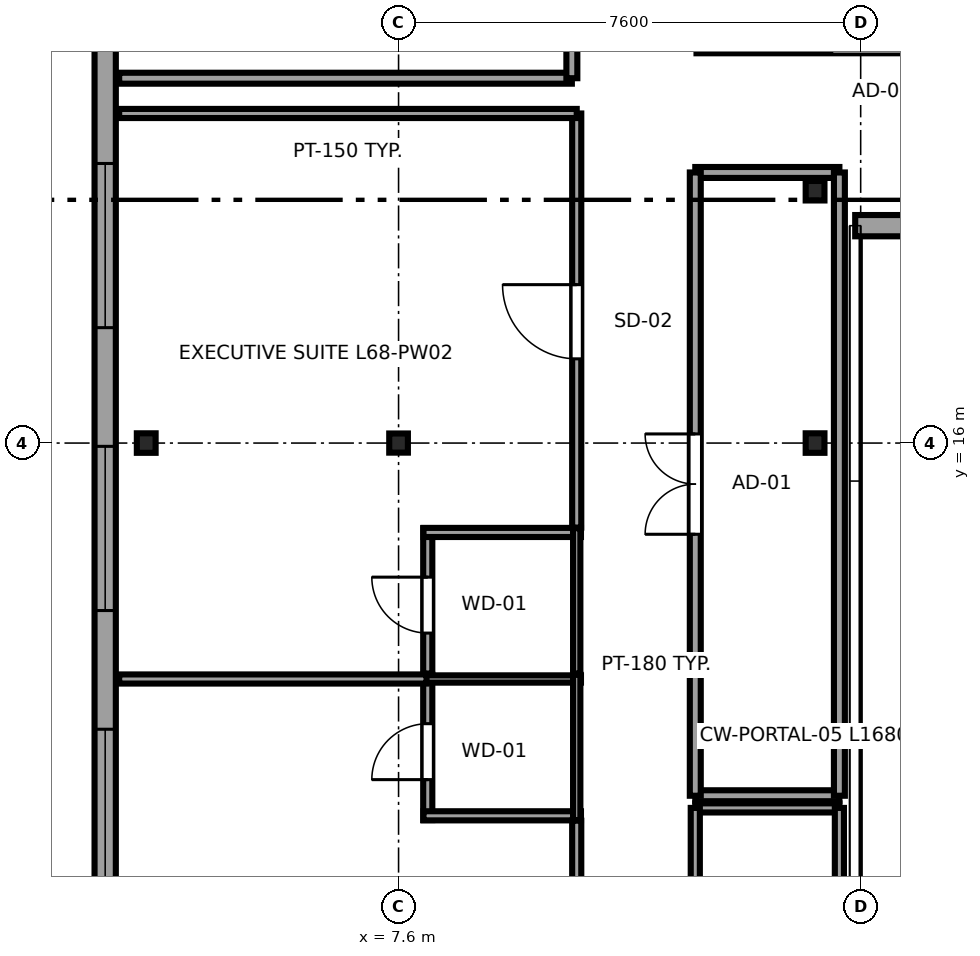
"""IFC4 building model, lengths in metres.
Left out: names, types, materials, properties, quantities, classifications, styles, units other than length and angle.
Written with IfcOpenShell. Run it as: python <this file> out.ifc"""

import sys

from ifc_helpers import new_model, si_unit, direction, frame, frame_2d, origin, origin_2d, place, context, subcontext, project, spatial, rectangle, i_section, extrude, source, transform, mapped, element, fill, save


model = new_model("IFC4")
c1 = context("Model", 3, precision=1e-05, world=origin(), true_north=direction((0.0, 1.0)))
c2 = subcontext(c1, "Body", "Model", "MODEL_VIEW")
j1 = project(units=[si_unit("LENGTHUNIT", "METRE"), si_unit("PLANEANGLEUNIT", "RADIAN")], contexts=[c1])
p1 = place(None, origin())
s1 = spatial("IfcSite", under=j1, at=p1, CompositionType="ELEMENT")
p2 = place(p1, origin())
s2 = spatial("IfcBuilding", under=s1, at=p2, CompositionType="ELEMENT")
p3 = place(p2, frame((0.0, 0.0, 255.85)))
s3 = spatial("IfcBuildingStorey", under=s2, at=p3, CompositionType="ELEMENT", Elevation=255.85)
m1 = source(origin(), c2, "Body", "SweptSolid", [
    extrude(i_section(OverallWidth=0.309, OverallDepth=0.321, WebThickness=0.014, FlangeThickness=0.022, FilletRadius=0.017, at=origin_2d()), origin(), (0.0, 0.0, 1.0), 3.55),
])
p4 = place(p3, frame((3.45, 16.0, 0.0), z_axis=(0.0, 0.0, 1.0), x_axis=(1.0, 0.0, 0.0)))
e1 = element("IfcColumn", 1, at=p4, inside=s3, PredefinedType="COLUMN", context=c2, shape_type="MappedRepresentation", body=[
    mapped(m1, transform((0.0, 0.0, 0.0), x_axis=(1.0, 0.0, 0.0), y_axis=(0.0, 1.0, 0.0), z_axis=(0.0, 0.0, 1.0), scale=1.0)),
])
m2 = source(origin(), c2, "Body", "SweptSolid", [
    extrude(i_section(OverallWidth=0.307, OverallDepth=0.315, WebThickness=0.012, FlangeThickness=0.019, FilletRadius=0.017, at=origin_2d()), origin(), (0.0, 0.0, 1.0), 3.55),
])
p5 = place(p3, frame((7.6, 16.0, 0.0), z_axis=(0.0, 0.0, 1.0), x_axis=(1.0, 0.0, 0.0)))
e2 = element("IfcColumn", 2, at=p5, inside=s3, PredefinedType="COLUMN", context=c2, shape_type="MappedRepresentation", body=[
    mapped(m2, transform((0.0, 0.0, 0.0), x_axis=(1.0, 0.0, 0.0), y_axis=(0.0, 1.0, 0.0), z_axis=(0.0, 0.0, 1.0), scale=1.0)),
])
for number, where, z_axis, x_axis in (
    (3, (14.45, 16.0, 0.0), (0.0, 0.0, 1.0), (1.0, 0.0, 0.0)),
    (4, (14.45, 20.15, 0.0), (0.0, 0.0, 1.0), (1.0, 0.0, 0.0)),
):
    element("IfcColumn", number, at=place(p3, frame(where, z_axis=z_axis, x_axis=x_axis)), inside=s3, PredefinedType="COLUMN", context=c2, shape_type="MappedRepresentation", body=[
        mapped(m1, transform((0.0, 0.0, 0.0), x_axis=(1.0, 0.0, 0.0), y_axis=(0.0, 1.0, 0.0), z_axis=(0.0, 0.0, 1.0), scale=1.0)),
    ])
p6 = place(p3, frame((15.11, 19.575, 0.0), z_axis=(0.0, 0.0, 1.0), x_axis=(1.0, 0.0, 0.0)))
e5 = element("IfcWall", 5, at=p6, inside=s3, PredefinedType="SOLIDWALL", context=c2, shape_type="SweptSolid", body=[
    extrude(rectangle(XDim=16.98, YDim=0.35, at=frame_2d((8.49, 0.0))), origin(), (0.0, 0.0, 1.0), 3.37),
])
p7 = place(p6, frame((1.88, 0.0, 0.68)))
e6 = element("IfcOpeningElement", 6, at=p7, cuts=e5, PredefinedType="OPENING", context=c2, shape_type="SweptSolid", body=[
    extrude(rectangle(XDim=2.7, YDim=1.95, at=frame_2d((1.35, 0.975))), frame((0.0, 0.185, 0.0), z_axis=(0.0, -1.0, 0.0), x_axis=(1.0, 0.0, 0.0)), (0.0, 0.0, 1.0), 0.37),
])
p8 = place(p6, frame((7.14, 0.0, 0.68)))
e7 = element("IfcOpeningElement", 7, at=p8, cuts=e5, PredefinedType="OPENING", context=c2, shape_type="SweptSolid", body=[
    extrude(rectangle(XDim=2.7, YDim=1.95, at=frame_2d((1.35, 0.975))), frame((0.0, 0.185, 0.0), z_axis=(0.0, -1.0, 0.0), x_axis=(1.0, 0.0, 0.0)), (0.0, 0.0, 1.0), 0.37),
])
p9 = place(p6, frame((12.4, 0.0, 0.68)))
e8 = element("IfcOpeningElement", 8, at=p9, cuts=e5, PredefinedType="OPENING", context=c2, shape_type="SweptSolid", body=[
    extrude(rectangle(XDim=2.7, YDim=1.95, at=frame_2d((1.35, 0.975))), frame((0.0, 0.185, 0.0), z_axis=(0.0, -1.0, 0.0), x_axis=(1.0, 0.0, 0.0)), (0.0, 0.0, 1.0), 0.37),
])
p10 = place(p3, frame((2.775, 40.783, 0.0), z_axis=(0.0, 0.0, 1.0), x_axis=(0.0, -1.0, 0.0)))
e9 = element("IfcWall", 9, at=p10, inside=s3, PredefinedType="SOLIDWALL", context=c2, shape_type="SweptSolid", body=[
    extrude(rectangle(XDim=33.766, YDim=0.35, at=frame_2d((16.883, 0.0))), origin(), (0.0, 0.0, 1.0), 3.37),
])
p11 = place(p10, frame((5.678, 0.0, 0.68)))
e10 = element("IfcOpeningElement", 10, at=p11, cuts=e9, PredefinedType="OPENING", context=c2, shape_type="SweptSolid", body=[
    extrude(rectangle(XDim=2.7, YDim=1.95, at=frame_2d((1.35, 0.975))), frame((0.0, 0.185, 0.0), z_axis=(0.0, -1.0, 0.0), x_axis=(1.0, 0.0, 0.0)), (0.0, 0.0, 1.0), 0.37),
])
p12 = place(p10, frame((11.431, 0.0, 0.68)))
e11 = element("IfcOpeningElement", 11, at=p12, cuts=e9, PredefinedType="OPENING", context=c2, shape_type="SweptSolid", body=[
    extrude(rectangle(XDim=2.7, YDim=1.95, at=frame_2d((1.35, 0.975))), frame((0.0, 0.185, 0.0), z_axis=(0.0, -1.0, 0.0), x_axis=(1.0, 0.0, 0.0)), (0.0, 0.0, 1.0), 0.37),
])
p13 = place(p10, frame((15.533, 0.0, 0.68)))
e12 = element("IfcOpeningElement", 12, at=p13, cuts=e9, PredefinedType="OPENING", context=c2, shape_type="SweptSolid", body=[
    extrude(rectangle(XDim=2.7, YDim=1.95, at=frame_2d((1.35, 0.975))), frame((0.0, 0.185, 0.0), z_axis=(0.0, -1.0, 0.0), x_axis=(1.0, 0.0, 0.0)), (0.0, 0.0, 1.0), 0.37),
])
p14 = place(p10, frame((20.185, 0.0, 0.68)))
e13 = element("IfcOpeningElement", 13, at=p14, cuts=e9, PredefinedType="OPENING", context=c2, shape_type="SweptSolid", body=[
    extrude(rectangle(XDim=2.7, YDim=1.95, at=frame_2d((1.35, 0.975))), frame((0.0, 0.185, 0.0), z_axis=(0.0, -1.0, 0.0), x_axis=(1.0, 0.0, 0.0)), (0.0, 0.0, 1.0), 0.37),
])
p15 = place(p10, frame((24.837, 0.0, 0.68)))
e14 = element("IfcOpeningElement", 14, at=p15, cuts=e9, PredefinedType="OPENING", context=c2, shape_type="SweptSolid", body=[
    extrude(rectangle(XDim=2.7, YDim=1.95, at=frame_2d((1.35, 0.975))), frame((0.0, 0.185, 0.0), z_axis=(0.0, -1.0, 0.0), x_axis=(1.0, 0.0, 0.0)), (0.0, 0.0, 1.0), 0.37),
])
p16 = place(p10, frame((29.489, 0.0, 0.68)))
e15 = element("IfcOpeningElement", 15, at=p16, cuts=e9, PredefinedType="OPENING", context=c2, shape_type="SweptSolid", body=[
    extrude(rectangle(XDim=2.7, YDim=1.95, at=frame_2d((1.35, 0.975))), frame((0.0, 0.185, 0.0), z_axis=(0.0, -1.0, 0.0), x_axis=(1.0, 0.0, 0.0)), (0.0, 0.0, 1.0), 0.37),
])
p17 = place(p3, frame((8.08, 9.8, 0.0), z_axis=(0.0, 0.0, 1.0), x_axis=(0.0, 1.0, 0.0)))
e16 = element("IfcWall", 16, at=p17, inside=s3, PredefinedType="PARTITIONING", context=c2, shape_type="SweptSolid", body=[
    extrude(rectangle(XDim=2.39, YDim=0.15, at=frame_2d((1.195, 0.0))), origin(), (0.0, 0.0, 1.0), 3.37),
])
p18 = place(p17, frame((0.665, 0.0, 0.0)))
e17 = element("IfcOpeningElement", 17, at=p18, cuts=e16, PredefinedType="OPENING", context=c2, shape_type="SweptSolid", body=[
    extrude(rectangle(XDim=0.92, YDim=2.01, at=frame_2d((0.46, 1.005))), frame((0.0, 0.085, 0.0), z_axis=(0.0, -1.0, 0.0), x_axis=(1.0, 0.0, 0.0)), (0.0, 0.0, 1.0), 0.17),
])
p19 = place(p3, frame((8.01, 9.87, 0.0), z_axis=(0.0, 0.0, 1.0), x_axis=(1.0, 0.0, 0.0)))
e18 = element("IfcWall", 18, at=p19, inside=s3, PredefinedType="PARTITIONING", context=c2, shape_type="SweptSolid", body=[
    extrude(rectangle(XDim=2.59, YDim=0.15, at=frame_2d((1.295, 0.0))), origin(), (0.0, 0.0, 1.0), 3.37),
])
p20 = place(p3, frame((8.01, 12.12, 0.0), z_axis=(0.0, 0.0, 1.0), x_axis=(1.0, 0.0, 0.0)))
e19 = element("IfcWall", 19, at=p20, inside=s3, PredefinedType="PLUMBINGWALL", context=c2, shape_type="SweptSolid", body=[
    extrude(rectangle(XDim=2.59, YDim=0.12, at=frame_2d((1.295, 0.0))), origin(), (0.0, 0.0, 1.0), 3.37),
])
p21 = place(p3, frame((10.53, 9.8, 0.0), z_axis=(0.0, 0.0, 1.0), x_axis=(0.0, 1.0, 0.0)))
e20 = element("IfcWall", 20, at=p21, inside=s3, PredefinedType="PLUMBINGWALL", context=c2, shape_type="SweptSolid", body=[
    extrude(rectangle(XDim=2.39, YDim=0.12, at=frame_2d((1.195, 0.0))), origin(), (0.0, 0.0, 1.0), 3.37),
])
p22 = place(p3, frame((8.08, 12.21, 0.0), z_axis=(0.0, 0.0, 1.0), x_axis=(0.0, 1.0, 0.0)))
e21 = element("IfcWall", 21, at=p22, inside=s3, PredefinedType="PARTITIONING", context=c2, shape_type="SweptSolid", body=[
    extrude(rectangle(XDim=2.39, YDim=0.15, at=frame_2d((1.195, 0.0))), origin(), (0.0, 0.0, 1.0), 3.37),
])
p23 = place(p22, frame((0.665, 0.0, 0.0)))
e22 = element("IfcOpeningElement", 22, at=p23, cuts=e21, PredefinedType="OPENING", context=c2, shape_type="SweptSolid", body=[
    extrude(rectangle(XDim=0.92, YDim=2.01, at=frame_2d((0.46, 1.005))), frame((0.0, 0.085, 0.0), z_axis=(0.0, -1.0, 0.0), x_axis=(1.0, 0.0, 0.0)), (0.0, 0.0, 1.0), 0.17),
])
p24 = place(p3, frame((8.01, 14.53, 0.0), z_axis=(0.0, 0.0, 1.0), x_axis=(1.0, 0.0, 0.0)))
e23 = element("IfcWall", 23, at=p24, inside=s3, PredefinedType="PARTITIONING", context=c2, shape_type="SweptSolid", body=[
    extrude(rectangle(XDim=2.59, YDim=0.15, at=frame_2d((1.295, 0.0))), origin(), (0.0, 0.0, 1.0), 3.37),
])
p25 = place(p3, frame((10.53, 12.21, 0.0), z_axis=(0.0, 0.0, 1.0), x_axis=(0.0, 1.0, 0.0)))
e24 = element("IfcWall", 24, at=p25, inside=s3, PredefinedType="PLUMBINGWALL", context=c2, shape_type="SweptSolid", body=[
    extrude(rectangle(XDim=2.39, YDim=0.12, at=frame_2d((1.195, 0.0))), origin(), (0.0, 0.0, 1.0), 3.37),
])
p26 = place(p3, frame((10.53, 3.005, 0.0), z_axis=(0.0, 0.0, 1.0), x_axis=(0.0, 1.0, 0.0)))
e25 = element("IfcWall", 25, at=p26, inside=s3, PredefinedType="PARTITIONING", context=c2, shape_type="SweptSolid", body=[
    extrude(rectangle(XDim=6.785, YDim=0.15, at=frame_2d((3.393, 0.0))), origin(), (0.0, 0.0, 1.0), 3.37),
])
p27 = place(p26, frame((2.79, 0.0, 0.0)))
e26 = element("IfcOpeningElement", 26, at=p27, cuts=e25, PredefinedType="OPENING", context=c2, shape_type="SweptSolid", body=[
    extrude(rectangle(XDim=1.22, YDim=2.08, at=frame_2d((0.61, 1.04))), frame((0.0, 0.085, 0.0), z_axis=(0.0, -1.0, 0.0), x_axis=(1.0, 0.0, 0.0)), (0.0, 0.0, 1.0), 0.17),
])
p28 = place(p3, frame((3.005, 12.12, 0.0), z_axis=(0.0, 0.0, 1.0), x_axis=(1.0, 0.0, 0.0)))
e27 = element("IfcWall", 27, at=p28, inside=s3, PredefinedType="PARTITIONING", context=c2, shape_type="SweptSolid", body=[
    extrude(rectangle(XDim=5.055, YDim=0.15, at=frame_2d((2.528, 0.0))), origin(), (0.0, 0.0, 1.0), 3.37),
])
p29 = place(p3, frame((10.53, 14.61, 0.0), z_axis=(0.0, 0.0, 1.0), x_axis=(0.0, 1.0, 0.0)))
e28 = element("IfcWall", 28, at=p29, inside=s3, PredefinedType="PARTITIONING", context=c2, shape_type="SweptSolid", body=[
    extrude(rectangle(XDim=6.81, YDim=0.15, at=frame_2d((3.405, 0.0))), origin(), (0.0, 0.0, 1.0), 3.37),
])
p30 = place(p29, frame((2.775, 0.0, 0.0)))
e29 = element("IfcOpeningElement", 29, at=p30, cuts=e28, PredefinedType="OPENING", context=c2, shape_type="SweptSolid", body=[
    extrude(rectangle(XDim=1.22, YDim=2.08, at=frame_2d((0.61, 1.04))), frame((0.0, 0.085, 0.0), z_axis=(0.0, -1.0, 0.0), x_axis=(1.0, 0.0, 0.0)), (0.0, 0.0, 1.0), 0.17),
])
p31 = place(p3, frame((3.005, 21.42, 0.0), z_axis=(0.0, 0.0, 1.0), x_axis=(1.0, 0.0, 0.0)))
e30 = element("IfcWall", 30, at=p31, inside=s3, PredefinedType="PARTITIONING", context=c2, shape_type="SweptSolid", body=[
    extrude(rectangle(XDim=7.525, YDim=0.15, at=frame_2d((3.763, 0.0))), origin(), (0.0, 0.0, 1.0), 3.37),
])
for number, where, z_axis, x_axis in (
    (31, (12.48, 10.2, 0.0), (0.0, 0.0, 1.0), (1.0, 0.0, 0.0)),
    (32, (12.48, 20.45, 0.0), (0.0, 0.0, 1.0), (1.0, 0.0, 0.0)),
):
    element("IfcWall", number, at=place(p3, frame(where, z_axis=z_axis, x_axis=x_axis)), inside=s3, PredefinedType="PARTITIONING", context=c2, shape_type="SweptSolid", body=[
        extrude(rectangle(XDim=2.37, YDim=0.18, at=frame_2d((1.185, 0.0))), origin(), (0.0, 0.0, 1.0), 3.37),
    ])
p32 = place(p3, frame((12.48, 10.2, 0.0), z_axis=(0.0, 0.0, 1.0), x_axis=(0.0, 1.0, 0.0)))
e33 = element("IfcWall", 33, at=p32, inside=s3, PredefinedType="PARTITIONING", context=c2, shape_type="SweptSolid", body=[
    extrude(rectangle(XDim=10.25, YDim=0.18, at=frame_2d((5.125, 0.0))), origin(), (0.0, 0.0, 1.0), 3.37),
])
p33 = place(p32, frame((4.3, 0.0, 0.0)))
e34 = element("IfcOpeningElement", 34, at=p33, cuts=e33, PredefinedType="OPENING", context=c2, shape_type="SweptSolid", body=[
    extrude(rectangle(XDim=1.65, YDim=2.15, at=frame_2d((0.825, 1.075))), frame((0.0, 0.1, 0.0), z_axis=(0.0, -1.0, 0.0), x_axis=(1.0, 0.0, 0.0)), (0.0, 0.0, 1.0), 0.2),
])
p34 = place(p3, frame((14.85, 10.2, 0.0), z_axis=(0.0, 0.0, 1.0), x_axis=(0.0, 1.0, 0.0)))
e35 = element("IfcWall", 35, at=p34, inside=s3, PredefinedType="PARTITIONING", context=c2, shape_type="SweptSolid", body=[
    extrude(rectangle(XDim=10.25, YDim=0.18, at=frame_2d((5.125, 0.0))), origin(), (0.0, 0.0, 1.0), 3.37),
])
p35 = place(p3, frame((12.48, 10.0, 0.0), z_axis=(0.0, 0.0, 1.0), x_axis=(1.0, 0.0, 0.0)))
e36 = element("IfcWall", 36, at=p35, inside=s3, PredefinedType="PARTITIONING", context=c2, shape_type="SweptSolid", body=[
    extrude(rectangle(XDim=2.37, YDim=0.15, at=frame_2d((1.185, 0.0))), origin(), (0.0, 0.0, 1.0), 3.37),
])
p36 = place(p3, frame((12.48, 3.005, 0.0), z_axis=(0.0, 0.0, 1.0), x_axis=(0.0, 1.0, 0.0)))
e37 = element("IfcWall", 37, at=p36, inside=s3, PredefinedType="PARTITIONING", context=c2, shape_type="SweptSolid", body=[
    extrude(rectangle(XDim=6.995, YDim=0.15, at=frame_2d((3.498, 0.0))), origin(), (0.0, 0.0, 1.0), 3.37),
])
p37 = place(p36, frame((2.673, 0.0, 0.0)))
e38 = element("IfcOpeningElement", 38, at=p37, cuts=e37, PredefinedType="OPENING", context=c2, shape_type="SweptSolid", body=[
    extrude(rectangle(XDim=1.65, YDim=2.15, at=frame_2d((0.825, 1.075))), frame((0.0, 0.085, 0.0), z_axis=(0.0, -1.0, 0.0), x_axis=(1.0, 0.0, 0.0)), (0.0, 0.0, 1.0), 0.17),
])
p38 = place(p3, frame((14.85, 3.005, 0.0), z_axis=(0.0, 0.0, 1.0), x_axis=(0.0, 1.0, 0.0)))
e39 = element("IfcWall", 39, at=p38, inside=s3, PredefinedType="PARTITIONING", context=c2, shape_type="SweptSolid", body=[
    extrude(rectangle(XDim=6.995, YDim=0.15, at=frame_2d((3.498, 0.0))), origin(), (0.0, 0.0, 1.0), 3.37),
])
p39 = place(p3, frame((12.5, 22.5, 0.0), z_axis=(0.0, 0.0, 1.0), x_axis=(1.0, 0.0, 0.0)))
e40 = element("IfcWall", 40, at=p39, inside=s3, PredefinedType="PARTITIONING", context=c2, shape_type="SweptSolid", body=[
    extrude(rectangle(XDim=6.1, YDim=0.18, at=frame_2d((3.05, 0.0))), origin(), (0.0, 0.0, 1.0), 3.37),
])
p40 = place(p39, frame((2.225, 0.0, 0.0)))
e41 = element("IfcOpeningElement", 41, at=p40, cuts=e40, PredefinedType="OPENING", context=c2, shape_type="SweptSolid", body=[
    extrude(rectangle(XDim=1.65, YDim=2.15, at=frame_2d((0.825, 1.075))), frame((0.0, 0.1, 0.0), z_axis=(0.0, -1.0, 0.0), x_axis=(1.0, 0.0, 0.0)), (0.0, 0.0, 1.0), 0.2),
])
p41 = place(p3, frame((3.005, 22.0, 0.0), z_axis=(0.0, 0.0, 1.0), x_axis=(1.0, 0.0, 0.0)))
e42 = element("IfcWall", 42, at=p41, inside=s3, PredefinedType="PARTITIONING", context=c2, shape_type="SweptSolid", body=[
    extrude(rectangle(XDim=7.445, YDim=0.18, at=frame_2d((3.723, 0.0))), origin(), (0.0, 0.0, 1.0), 3.37),
])
p42 = place(p3, frame((10.45, 22.0, 0.0), z_axis=(0.0, 0.0, 1.0), x_axis=(0.0, 1.0, 0.0)))
e43 = element("IfcWall", 43, at=p42, inside=s3, PredefinedType="PARTITIONING", context=c2, shape_type="SweptSolid", body=[
    extrude(rectangle(XDim=4.3, YDim=0.18, at=frame_2d((2.15, 0.0))), origin(), (0.0, 0.0, 1.0), 3.37),
])
p43 = place(p42, frame((1.325, 0.0, 0.0)))
e44 = element("IfcOpeningElement", 44, at=p43, cuts=e43, PredefinedType="OPENING", context=c2, shape_type="SweptSolid", body=[
    extrude(rectangle(XDim=1.65, YDim=2.15, at=frame_2d((0.825, 1.075))), frame((0.0, 0.1, 0.0), z_axis=(0.0, -1.0, 0.0), x_axis=(1.0, 0.0, 0.0)), (0.0, 0.0, 1.0), 0.2),
])
m3 = source(origin(), c2, "Body", "SweptSolid", [
    extrude(rectangle(XDim=2.7, YDim=1.95, at=frame_2d((1.35, 0.975))), frame((0.0, 0.09, 0.0), z_axis=(0.0, -1.0, 0.0), x_axis=(1.0, 0.0, 0.0)), (0.0, 0.0, 1.0), 0.06),
])
p44 = place(p14, origin())
e45 = element("IfcWindow", 45, at=p44, inside=s3, PartitioningType="TRIPLE_PANEL_HORIZONTAL", PredefinedType="WINDOW", context=c2, shape_type="MappedRepresentation", body=[
    mapped(m3, transform((0.0, 0.0, 0.0), x_axis=(1.0, 0.0, 0.0), y_axis=(0.0, 1.0, 0.0), z_axis=(0.0, 0.0, 1.0), scale=1.0)),
])
fill(e13, e45)
p45 = place(p15, origin())
e46 = element("IfcWindow", 46, at=p45, inside=s3, PartitioningType="TRIPLE_PANEL_HORIZONTAL", PredefinedType="WINDOW", context=c2, shape_type="MappedRepresentation", body=[
    mapped(m3, transform((0.0, 0.0, 0.0), x_axis=(1.0, 0.0, 0.0), y_axis=(0.0, 1.0, 0.0), z_axis=(0.0, 0.0, 1.0), scale=1.0)),
])
fill(e14, e46)
p46 = place(p16, origin())
e47 = element("IfcWindow", 47, at=p46, inside=s3, PartitioningType="TRIPLE_PANEL_HORIZONTAL", PredefinedType="WINDOW", context=c2, shape_type="MappedRepresentation", body=[
    mapped(m3, transform((0.0, 0.0, 0.0), x_axis=(1.0, 0.0, 0.0), y_axis=(0.0, 1.0, 0.0), z_axis=(0.0, 0.0, 1.0), scale=1.0)),
])
fill(e15, e47)
m4 = source(origin(), c2, "Body", "SweptSolid", [
    extrude(rectangle(XDim=0.92, YDim=2.01, at=frame_2d((0.46, 1.005))), frame((0.0, 0.025, 0.0), z_axis=(0.0, -1.0, 0.0), x_axis=(1.0, 0.0, 0.0)), (0.0, 0.0, 1.0), 0.05),
])
p47 = place(p18, origin())
e48 = element("IfcDoor", 48, at=p47, inside=s3, OperationType="SINGLE_SWING_LEFT", PredefinedType="DOOR", context=c2, shape_type="MappedRepresentation", body=[
    mapped(m4, transform((0.0, 0.0, 0.0), x_axis=(1.0, 0.0, 0.0), y_axis=(0.0, 1.0, 0.0), z_axis=(0.0, 0.0, 1.0), scale=1.0)),
])
fill(e17, e48)
p48 = place(p23, origin())
e49 = element("IfcDoor", 49, at=p48, inside=s3, OperationType="SINGLE_SWING_RIGHT", PredefinedType="DOOR", context=c2, shape_type="MappedRepresentation", body=[
    mapped(m4, transform((0.0, 0.0, 0.0), x_axis=(1.0, 0.0, 0.0), y_axis=(0.0, 1.0, 0.0), z_axis=(0.0, 0.0, 1.0), scale=1.0)),
])
fill(e22, e49)
m5 = source(origin(), c2, "Body", "SweptSolid", [
    extrude(rectangle(XDim=1.22, YDim=2.08, at=frame_2d((0.61, 1.04))), frame((0.0, 0.025, 0.0), z_axis=(0.0, -1.0, 0.0), x_axis=(1.0, 0.0, 0.0)), (0.0, 0.0, 1.0), 0.05),
])
p49 = place(p30, origin())
e50 = element("IfcDoor", 50, at=p49, inside=s3, OperationType="SINGLE_SWING_RIGHT", PredefinedType="DOOR", context=c2, shape_type="MappedRepresentation", body=[
    mapped(m5, transform((0.0, 0.0, 0.0), x_axis=(1.0, 0.0, 0.0), y_axis=(0.0, 1.0, 0.0), z_axis=(0.0, 0.0, 1.0), scale=1.0)),
])
fill(e29, e50)
m6 = source(origin(), c2, "Body", "SweptSolid", [
    extrude(rectangle(XDim=1.65, YDim=2.15, at=frame_2d((0.825, 1.075))), frame((0.0, 0.025, 0.0), z_axis=(0.0, -1.0, 0.0), x_axis=(1.0, 0.0, 0.0)), (0.0, 0.0, 1.0), 0.05),
])
p50 = place(p33, origin())
e51 = element("IfcDoor", 51, at=p50, inside=s3, OperationType="DOUBLE_DOOR_SINGLE_SWING", PredefinedType="DOOR", context=c2, shape_type="MappedRepresentation", body=[
    mapped(m6, transform((0.0, 0.0, 0.0), x_axis=(1.0, 0.0, 0.0), y_axis=(0.0, 1.0, 0.0), z_axis=(0.0, 0.0, 1.0), scale=1.0)),
])
fill(e34, e51)
save(model, sys.argv[1])
